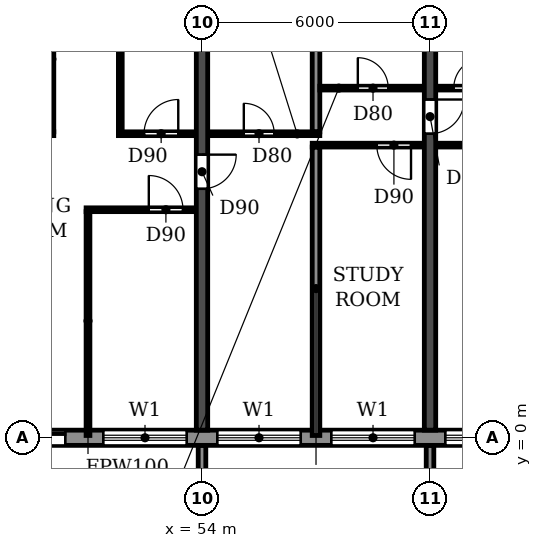
"""IFC4 building model, lengths in metres.
Left out: names, types, materials, properties, quantities, classifications, styles, units other than length and angle.
Written with IfcOpenShell. Run it as: python <this file> out.ifc"""

import sys

from ifc_helpers import new_model, si_unit, direction, frame, frame_2d, origin, place, context, subcontext, project, spatial, polyline, rectangle, outline, extrude, source, transform, mapped, element, fill, save


model = new_model("IFC4")
c1 = context("Model", 3, precision=1e-05, world=origin(), true_north=direction((0.0, 1.0)))
c2 = subcontext(c1, "Body", "Model", "MODEL_VIEW")
j1 = project(units=[si_unit("LENGTHUNIT", "METRE"), si_unit("PLANEANGLEUNIT", "RADIAN")], contexts=[c1])
p1 = place(None, origin())
s1 = spatial("IfcSite", under=j1, at=p1, CompositionType="ELEMENT")
p2 = place(p1, origin())
s2 = spatial("IfcBuilding", under=s1, at=p2, CompositionType="ELEMENT")
p3 = place(p2, frame((0.0, 0.0, 155.4)))
s3 = spatial("IfcBuildingStorey", under=s2, at=p3, CompositionType="ELEMENT", Elevation=155.4)
p4 = place(p3, frame((54.0, 0.2, 0.0), z_axis=(0.0, 0.0, 1.0), x_axis=(0.0, 1.0, 0.0)))
e1 = element("IfcWall", 1, at=p4, inside=s3, PredefinedType="SHEAR", context=c2, shape_type="SweptSolid", body=[
    extrude(rectangle(XDim=11.675, YDim=0.3, at=frame_2d((5.837, 0.0))), origin(), (0.0, 0.0, 1.0), 3.0),
])
p5 = place(p4, frame((6.35, 0.0, 0.0)))
e2 = element("IfcOpeningElement", 2, at=p5, cuts=e1, PredefinedType="OPENING", context=c2, shape_type="SweptSolid", body=[
    extrude(rectangle(XDim=0.9, YDim=2.1, at=frame_2d((0.45, 1.05))), frame((0.0, 0.16, 0.0), z_axis=(0.0, -1.0, 0.0), x_axis=(1.0, 0.0, 0.0)), (0.0, 0.0, 1.0), 0.32),
])
p6 = place(p3, frame((60.0, 0.2, 0.0), z_axis=(0.0, 0.0, 1.0), x_axis=(0.0, 1.0, 0.0)))
e3 = element("IfcWall", 3, at=p6, inside=s3, PredefinedType="SHEAR", context=c2, shape_type="SweptSolid", body=[
    extrude(rectangle(XDim=11.675, YDim=0.3, at=frame_2d((5.837, 0.0))), origin(), (0.0, 0.0, 1.0), 3.0),
])
p7 = place(p6, frame((7.8, 0.0, 0.0)))
e4 = element("IfcOpeningElement", 4, at=p7, cuts=e3, PredefinedType="OPENING", context=c2, shape_type="SweptSolid", body=[
    extrude(rectangle(XDim=0.9, YDim=2.1, at=frame_2d((0.45, 1.05))), frame((0.0, 0.16, 0.0), z_axis=(0.0, -1.0, 0.0), x_axis=(1.0, 0.0, 0.0)), (0.0, 0.0, 1.0), 0.32),
])
p8 = place(p3, frame((16.683, 0.0, 0.0), z_axis=(0.0, 0.0, 1.0), x_axis=(1.0, 0.0, 0.0)))
e5 = element("IfcWall", 5, at=p8, inside=s3, PredefinedType="STANDARD", context=c2, shape_type="SweptSolid", body=[
    extrude(rectangle(XDim=68.634, YDim=0.4, at=frame_2d((34.317, 0.0))), origin(), (0.0, 0.0, 1.0), 3.0),
])
p9 = place(p8, frame((1.717, 0.0, 0.9)))
e6 = element("IfcOpeningElement", 6, at=p9, cuts=e5, PredefinedType="OPENING", context=c2, shape_type="SweptSolid", body=[
    extrude(rectangle(XDim=2.2, YDim=1.5, at=frame_2d((1.1, 0.75))), frame((0.0, 0.21, 0.0), z_axis=(0.0, -1.0, 0.0), x_axis=(1.0, 0.0, 0.0)), (0.0, 0.0, 1.0), 0.42),
])
p10 = place(p8, frame((4.717, 0.0, 0.9)))
e7 = element("IfcOpeningElement", 7, at=p10, cuts=e5, PredefinedType="OPENING", context=c2, shape_type="SweptSolid", body=[
    extrude(rectangle(XDim=2.2, YDim=1.5, at=frame_2d((1.1, 0.75))), frame((0.0, 0.21, 0.0), z_axis=(0.0, -1.0, 0.0), x_axis=(1.0, 0.0, 0.0)), (0.0, 0.0, 1.0), 0.42),
])
p11 = place(p8, frame((7.917, 0.0, 0.0)))
e8 = element("IfcOpeningElement", 8, at=p11, cuts=e5, PredefinedType="OPENING", context=c2, shape_type="SweptSolid", body=[
    extrude(rectangle(XDim=1.8, YDim=2.4, at=frame_2d((0.9, 1.2))), frame((0.0, 0.21, 0.0), z_axis=(0.0, -1.0, 0.0), x_axis=(1.0, 0.0, 0.0)), (0.0, 0.0, 1.0), 0.42),
])
p12 = place(p8, frame((10.717, 0.0, 0.9)))
e9 = element("IfcOpeningElement", 9, at=p12, cuts=e5, PredefinedType="OPENING", context=c2, shape_type="SweptSolid", body=[
    extrude(rectangle(XDim=2.2, YDim=1.5, at=frame_2d((1.1, 0.75))), frame((0.0, 0.21, 0.0), z_axis=(0.0, -1.0, 0.0), x_axis=(1.0, 0.0, 0.0)), (0.0, 0.0, 1.0), 0.42),
])
p13 = place(p8, frame((13.717, 0.0, 0.9)))
e10 = element("IfcOpeningElement", 10, at=p13, cuts=e5, PredefinedType="OPENING", context=c2, shape_type="SweptSolid", body=[
    extrude(rectangle(XDim=2.2, YDim=1.5, at=frame_2d((1.1, 0.75))), frame((0.0, 0.21, 0.0), z_axis=(0.0, -1.0, 0.0), x_axis=(1.0, 0.0, 0.0)), (0.0, 0.0, 1.0), 0.42),
])
p14 = place(p8, frame((16.717, 0.0, 0.9)))
e11 = element("IfcOpeningElement", 11, at=p14, cuts=e5, PredefinedType="OPENING", context=c2, shape_type="SweptSolid", body=[
    extrude(rectangle(XDim=2.2, YDim=1.5, at=frame_2d((1.1, 0.75))), frame((0.0, 0.21, 0.0), z_axis=(0.0, -1.0, 0.0), x_axis=(1.0, 0.0, 0.0)), (0.0, 0.0, 1.0), 0.42),
])
p15 = place(p8, frame((19.717, 0.0, 0.9)))
e12 = element("IfcOpeningElement", 12, at=p15, cuts=e5, PredefinedType="OPENING", context=c2, shape_type="SweptSolid", body=[
    extrude(rectangle(XDim=2.2, YDim=1.5, at=frame_2d((1.1, 0.75))), frame((0.0, 0.21, 0.0), z_axis=(0.0, -1.0, 0.0), x_axis=(1.0, 0.0, 0.0)), (0.0, 0.0, 1.0), 0.42),
])
p16 = place(p8, frame((22.917, 0.0, 0.0)))
e13 = element("IfcOpeningElement", 13, at=p16, cuts=e5, PredefinedType="OPENING", context=c2, shape_type="SweptSolid", body=[
    extrude(rectangle(XDim=1.8, YDim=2.4, at=frame_2d((0.9, 1.2))), frame((0.0, 0.21, 0.0), z_axis=(0.0, -1.0, 0.0), x_axis=(1.0, 0.0, 0.0)), (0.0, 0.0, 1.0), 0.42),
])
p17 = place(p8, frame((25.717, 0.0, 0.9)))
e14 = element("IfcOpeningElement", 14, at=p17, cuts=e5, PredefinedType="OPENING", context=c2, shape_type="SweptSolid", body=[
    extrude(rectangle(XDim=2.2, YDim=1.5, at=frame_2d((1.1, 0.75))), frame((0.0, 0.21, 0.0), z_axis=(0.0, -1.0, 0.0), x_axis=(1.0, 0.0, 0.0)), (0.0, 0.0, 1.0), 0.42),
])
p18 = place(p8, frame((28.717, 0.0, 0.9)))
e15 = element("IfcOpeningElement", 15, at=p18, cuts=e5, PredefinedType="OPENING", context=c2, shape_type="SweptSolid", body=[
    extrude(rectangle(XDim=2.2, YDim=1.5, at=frame_2d((1.1, 0.75))), frame((0.0, 0.21, 0.0), z_axis=(0.0, -1.0, 0.0), x_axis=(1.0, 0.0, 0.0)), (0.0, 0.0, 1.0), 0.42),
])
p19 = place(p8, frame((31.917, 0.0, 0.0)))
e16 = element("IfcOpeningElement", 16, at=p19, cuts=e5, PredefinedType="OPENING", context=c2, shape_type="SweptSolid", body=[
    extrude(rectangle(XDim=1.8, YDim=2.4, at=frame_2d((0.9, 1.2))), frame((0.0, 0.21, 0.0), z_axis=(0.0, -1.0, 0.0), x_axis=(1.0, 0.0, 0.0)), (0.0, 0.0, 1.0), 0.42),
])
p20 = place(p8, frame((34.717, 0.0, 0.9)))
e17 = element("IfcOpeningElement", 17, at=p20, cuts=e5, PredefinedType="OPENING", context=c2, shape_type="SweptSolid", body=[
    extrude(rectangle(XDim=2.2, YDim=1.5, at=frame_2d((1.1, 0.75))), frame((0.0, 0.21, 0.0), z_axis=(0.0, -1.0, 0.0), x_axis=(1.0, 0.0, 0.0)), (0.0, 0.0, 1.0), 0.42),
])
p21 = place(p8, frame((37.717, 0.0, 0.9)))
e18 = element("IfcOpeningElement", 18, at=p21, cuts=e5, PredefinedType="OPENING", context=c2, shape_type="SweptSolid", body=[
    extrude(rectangle(XDim=2.2, YDim=1.5, at=frame_2d((1.1, 0.75))), frame((0.0, 0.21, 0.0), z_axis=(0.0, -1.0, 0.0), x_axis=(1.0, 0.0, 0.0)), (0.0, 0.0, 1.0), 0.42),
])
p22 = place(p8, frame((40.717, 0.0, 0.9)))
e19 = element("IfcOpeningElement", 19, at=p22, cuts=e5, PredefinedType="OPENING", context=c2, shape_type="SweptSolid", body=[
    extrude(rectangle(XDim=2.2, YDim=1.5, at=frame_2d((1.1, 0.75))), frame((0.0, 0.21, 0.0), z_axis=(0.0, -1.0, 0.0), x_axis=(1.0, 0.0, 0.0)), (0.0, 0.0, 1.0), 0.42),
])
p23 = place(p8, frame((43.717, 0.0, 0.9)))
e20 = element("IfcOpeningElement", 20, at=p23, cuts=e5, PredefinedType="OPENING", context=c2, shape_type="SweptSolid", body=[
    extrude(rectangle(XDim=2.2, YDim=1.5, at=frame_2d((1.1, 0.75))), frame((0.0, 0.21, 0.0), z_axis=(0.0, -1.0, 0.0), x_axis=(1.0, 0.0, 0.0)), (0.0, 0.0, 1.0), 0.42),
])
p24 = place(p8, frame((46.917, 0.0, 0.0)))
e21 = element("IfcOpeningElement", 21, at=p24, cuts=e5, PredefinedType="OPENING", context=c2, shape_type="SweptSolid", body=[
    extrude(rectangle(XDim=1.8, YDim=2.4, at=frame_2d((0.9, 1.2))), frame((0.0, 0.21, 0.0), z_axis=(0.0, -1.0, 0.0), x_axis=(1.0, 0.0, 0.0)), (0.0, 0.0, 1.0), 0.42),
])
p25 = place(p8, frame((49.717, 0.0, 0.9)))
e22 = element("IfcOpeningElement", 22, at=p25, cuts=e5, PredefinedType="OPENING", context=c2, shape_type="SweptSolid", body=[
    extrude(rectangle(XDim=2.2, YDim=1.5, at=frame_2d((1.1, 0.75))), frame((0.0, 0.21, 0.0), z_axis=(0.0, -1.0, 0.0), x_axis=(1.0, 0.0, 0.0)), (0.0, 0.0, 1.0), 0.42),
])
p26 = place(p8, frame((52.717, 0.0, 0.9)))
e23 = element("IfcOpeningElement", 23, at=p26, cuts=e5, PredefinedType="OPENING", context=c2, shape_type="SweptSolid", body=[
    extrude(rectangle(XDim=2.2, YDim=1.5, at=frame_2d((1.1, 0.75))), frame((0.0, 0.21, 0.0), z_axis=(0.0, -1.0, 0.0), x_axis=(1.0, 0.0, 0.0)), (0.0, 0.0, 1.0), 0.42),
])
p27 = place(p8, frame((55.717, 0.0, 0.9)))
e24 = element("IfcOpeningElement", 24, at=p27, cuts=e5, PredefinedType="OPENING", context=c2, shape_type="SweptSolid", body=[
    extrude(rectangle(XDim=2.2, YDim=1.5, at=frame_2d((1.1, 0.75))), frame((0.0, 0.21, 0.0), z_axis=(0.0, -1.0, 0.0), x_axis=(1.0, 0.0, 0.0)), (0.0, 0.0, 1.0), 0.42),
])
p28 = place(p8, frame((58.917, 0.0, 0.0)))
e25 = element("IfcOpeningElement", 25, at=p28, cuts=e5, PredefinedType="OPENING", context=c2, shape_type="SweptSolid", body=[
    extrude(rectangle(XDim=1.8, YDim=2.4, at=frame_2d((0.9, 1.2))), frame((0.0, 0.21, 0.0), z_axis=(0.0, -1.0, 0.0), x_axis=(1.0, 0.0, 0.0)), (0.0, 0.0, 1.0), 0.42),
])
p29 = place(p8, frame((61.717, 0.0, 0.9)))
e26 = element("IfcOpeningElement", 26, at=p29, cuts=e5, PredefinedType="OPENING", context=c2, shape_type="SweptSolid", body=[
    extrude(rectangle(XDim=2.2, YDim=1.5, at=frame_2d((1.1, 0.75))), frame((0.0, 0.21, 0.0), z_axis=(0.0, -1.0, 0.0), x_axis=(1.0, 0.0, 0.0)), (0.0, 0.0, 1.0), 0.42),
])
p30 = place(p8, frame((64.717, 0.0, 0.9)))
e27 = element("IfcOpeningElement", 27, at=p30, cuts=e5, PredefinedType="OPENING", context=c2, shape_type="SweptSolid", body=[
    extrude(rectangle(XDim=2.2, YDim=1.5, at=frame_2d((1.1, 0.75))), frame((0.0, 0.21, 0.0), z_axis=(0.0, -1.0, 0.0), x_axis=(1.0, 0.0, 0.0)), (0.0, 0.0, 1.0), 0.42),
])
m1 = source(origin(), c2, "Body", "SweptSolid", [
    extrude(outline(polyline([(0.0, 0.0), (0.2, 0.0), (0.2, 1.65), (0.0, 1.65), (0.0, 0.0)])), origin(), (0.0, 0.0, 1.0), 3.1),
])
for number, where in (
    (28, (53.9, -1.85, 0.0)),
    (29, (59.9, -1.85, 0.0)),
):
    element("IfcWall", number, at=place(p3, frame(where)), inside=s3, PredefinedType="STANDARD", context=c2, shape_type="MappedRepresentation", body=[
        mapped(m1, transform((0.0, 0.0, 0.0))),
    ])
p31 = place(p3, frame((57.0, 0.06, 0.0), z_axis=(0.0, 0.0, 1.0), x_axis=(0.0, 1.0, 0.0)))
e30 = element("IfcWall", 30, at=p31, inside=s3, PredefinedType="PARTITIONING", context=c2, shape_type="SweptSolid", body=[
    extrude(rectangle(XDim=7.59, YDim=0.2, at=frame_2d((3.795, 0.0))), origin(), (0.0, 0.0, 1.0), 3.0),
])
p32 = place(p3, frame((57.0, 8.05, 0.0), z_axis=(0.0, 0.0, 1.0), x_axis=(0.0, 1.0, 0.0)))
e31 = element("IfcWall", 31, at=p32, inside=s3, PredefinedType="PARTITIONING", context=c2, shape_type="SweptSolid", body=[
    extrude(rectangle(XDim=3.815, YDim=0.2, at=frame_2d((1.907, 0.0))), origin(), (0.0, 0.0, 1.0), 3.0),
])
p33 = place(p3, frame((50.95, 6.0, 0.0), z_axis=(0.0, 0.0, 1.0), x_axis=(1.0, 0.0, 0.0)))
e32 = element("IfcWall", 32, at=p33, inside=s3, PredefinedType="PARTITIONING", context=c2, shape_type="SweptSolid", body=[
    extrude(rectangle(XDim=2.89, YDim=0.1, at=frame_2d((1.445, 0.0))), origin(), (0.0, 0.0, 1.0), 3.0),
])
p34 = place(p33, frame((1.65, 0.0, 0.0)))
e33 = element("IfcOpeningElement", 33, at=p34, cuts=e32, PredefinedType="OPENING", context=c2, shape_type="SweptSolid", body=[
    extrude(rectangle(XDim=0.9, YDim=2.1, at=frame_2d((0.45, 1.05))), frame((0.0, 0.06, 0.0), z_axis=(0.0, -1.0, 0.0), x_axis=(1.0, 0.0, 0.0)), (0.0, 0.0, 1.0), 0.12),
])
p35 = place(p3, frame((56.9, 7.7, 0.0), z_axis=(0.0, 0.0, 1.0), x_axis=(1.0, 0.0, 0.0)))
e34 = element("IfcWall", 34, at=p35, inside=s3, PredefinedType="PARTITIONING", context=c2, shape_type="SweptSolid", body=[
    extrude(rectangle(XDim=2.94, YDim=0.1, at=frame_2d((1.47, 0.0))), origin(), (0.0, 0.0, 1.0), 3.0),
])
p36 = place(p35, frame((1.7, 0.0, 0.0)))
e35 = element("IfcOpeningElement", 35, at=p36, cuts=e34, PredefinedType="OPENING", context=c2, shape_type="SweptSolid", body=[
    extrude(rectangle(XDim=0.9, YDim=2.1, at=frame_2d((0.45, 1.05))), frame((0.0, 0.06, 0.0), z_axis=(0.0, -1.0, 0.0), x_axis=(1.0, 0.0, 0.0)), (0.0, 0.0, 1.0), 0.12),
])
p37 = place(p3, frame((60.16, 7.7, 0.0), z_axis=(0.0, 0.0, 1.0), x_axis=(1.0, 0.0, 0.0)))
e36 = element("IfcWall", 36, at=p37, inside=s3, PredefinedType="PARTITIONING", context=c2, shape_type="SweptSolid", body=[
    extrude(rectangle(XDim=2.89, YDim=0.1, at=frame_2d((1.445, 0.0))), origin(), (0.0, 0.0, 1.0), 3.0),
])
p38 = place(p37, frame((1.44, 0.0, 0.0)))
e37 = element("IfcOpeningElement", 37, at=p38, cuts=e36, PredefinedType="OPENING", context=c2, shape_type="SweptSolid", body=[
    extrude(rectangle(XDim=0.9, YDim=2.1, at=frame_2d((0.45, 1.05))), frame((0.0, 0.06, 0.0), z_axis=(0.0, -1.0, 0.0), x_axis=(1.0, 0.0, 0.0)), (0.0, 0.0, 1.0), 0.12),
])
p39 = place(p3, frame((48.16, 8.0, 0.0), z_axis=(0.0, 0.0, 1.0), x_axis=(1.0, 0.0, 0.0)))
e38 = element("IfcWall", 38, at=p39, inside=s3, PredefinedType="PARTITIONING", context=c2, shape_type="SweptSolid", body=[
    extrude(rectangle(XDim=1.94, YDim=0.1, at=frame_2d((0.97, 0.0))), origin(), (0.0, 0.0, 1.0), 3.0),
])
p40 = place(p39, frame((0.465, 0.0, 0.0)))
e39 = element("IfcOpeningElement", 39, at=p40, cuts=e38, PredefinedType="OPENING", context=c2, shape_type="SweptSolid", body=[
    extrude(rectangle(XDim=0.8, YDim=2.1, at=frame_2d((0.4, 1.05))), frame((0.0, 0.06, 0.0), z_axis=(0.0, -1.0, 0.0), x_axis=(1.0, 0.0, 0.0)), (0.0, 0.0, 1.0), 0.12),
])
p41 = place(p3, frame((51.8, 8.0, 0.0), z_axis=(0.0, 0.0, 1.0), x_axis=(1.0, 0.0, 0.0)))
e40 = element("IfcWall", 40, at=p41, inside=s3, PredefinedType="PARTITIONING", context=c2, shape_type="SweptSolid", body=[
    extrude(rectangle(XDim=2.04, YDim=0.1, at=frame_2d((1.02, 0.0))), origin(), (0.0, 0.0, 1.0), 3.0),
])
p42 = place(p41, frame((0.675, 0.0, 0.0)))
e41 = element("IfcOpeningElement", 41, at=p42, cuts=e40, PredefinedType="OPENING", context=c2, shape_type="SweptSolid", body=[
    extrude(rectangle(XDim=0.9, YDim=2.1, at=frame_2d((0.45, 1.05))), frame((0.0, 0.06, 0.0), z_axis=(0.0, -1.0, 0.0), x_axis=(1.0, 0.0, 0.0)), (0.0, 0.0, 1.0), 0.12),
])
p43 = place(p3, frame((54.16, 8.0, 0.0), z_axis=(0.0, 0.0, 1.0), x_axis=(1.0, 0.0, 0.0)))
e42 = element("IfcWall", 42, at=p43, inside=s3, PredefinedType="PARTITIONING", context=c2, shape_type="SweptSolid", body=[
    extrude(rectangle(XDim=2.94, YDim=0.1, at=frame_2d((1.47, 0.0))), origin(), (0.0, 0.0, 1.0), 3.0),
])
p44 = place(p43, frame((0.94, 0.0, 0.0)))
e43 = element("IfcOpeningElement", 43, at=p44, cuts=e42, PredefinedType="OPENING", context=c2, shape_type="SweptSolid", body=[
    extrude(rectangle(XDim=0.8, YDim=2.1, at=frame_2d((0.4, 1.05))), frame((0.0, 0.06, 0.0), z_axis=(0.0, -1.0, 0.0), x_axis=(1.0, 0.0, 0.0)), (0.0, 0.0, 1.0), 0.12),
])
p45 = place(p3, frame((57.1, 9.2, 0.0), z_axis=(0.0, 0.0, 1.0), x_axis=(1.0, 0.0, 0.0)))
e44 = element("IfcWall", 44, at=p45, inside=s3, PredefinedType="PARTITIONING", context=c2, shape_type="SweptSolid", body=[
    extrude(rectangle(XDim=2.74, YDim=0.1, at=frame_2d((1.37, 0.0))), origin(), (0.0, 0.0, 1.0), 3.0),
])
p46 = place(p45, frame((1.0, 0.0, 0.0)))
e45 = element("IfcOpeningElement", 45, at=p46, cuts=e44, PredefinedType="OPENING", context=c2, shape_type="SweptSolid", body=[
    extrude(rectangle(XDim=0.8, YDim=2.1, at=frame_2d((0.4, 1.05))), frame((0.0, 0.06, 0.0), z_axis=(0.0, -1.0, 0.0), x_axis=(1.0, 0.0, 0.0)), (0.0, 0.0, 1.0), 0.12),
])
p47 = place(p3, frame((60.16, 9.2, 0.0), z_axis=(0.0, 0.0, 1.0), x_axis=(1.0, 0.0, 0.0)))
e46 = element("IfcWall", 46, at=p47, inside=s3, PredefinedType="PARTITIONING", context=c2, shape_type="SweptSolid", body=[
    extrude(rectangle(XDim=1.94, YDim=0.1, at=frame_2d((0.97, 0.0))), origin(), (0.0, 0.0, 1.0), 3.0),
])
p48 = place(p47, frame((0.465, 0.0, 0.0)))
e47 = element("IfcOpeningElement", 47, at=p48, cuts=e46, PredefinedType="OPENING", context=c2, shape_type="SweptSolid", body=[
    extrude(rectangle(XDim=0.8, YDim=2.1, at=frame_2d((0.4, 1.05))), frame((0.0, 0.06, 0.0), z_axis=(0.0, -1.0, 0.0), x_axis=(1.0, 0.0, 0.0)), (0.0, 0.0, 1.0), 0.12),
])
p49 = place(p3, frame((50.05, 8.05, 0.0), z_axis=(0.0, 0.0, 1.0), x_axis=(0.0, 1.0, 0.0)))
e48 = element("IfcWall", 48, at=p49, inside=s3, PredefinedType="PARTITIONING", context=c2, shape_type="SweptSolid", body=[
    extrude(rectangle(XDim=3.815, YDim=0.1, at=frame_2d((1.907, 0.0))), origin(), (0.0, 0.0, 1.0), 3.0),
])
p50 = place(p3, frame((51.0, 0.06, 0.0), z_axis=(0.0, 0.0, 1.0), x_axis=(0.0, 1.0, 0.0)))
e49 = element("IfcWall", 49, at=p50, inside=s3, PredefinedType="PARTITIONING", context=c2, shape_type="SweptSolid", body=[
    extrude(rectangle(XDim=5.89, YDim=0.1, at=frame_2d((2.945, 0.0))), origin(), (0.0, 0.0, 1.0), 3.0),
])
p51 = place(p3, frame((51.85, 8.05, 0.0), z_axis=(0.0, 0.0, 1.0), x_axis=(0.0, 1.0, 0.0)))
e50 = element("IfcWall", 50, at=p51, inside=s3, PredefinedType="PARTITIONING", context=c2, shape_type="SweptSolid", body=[
    extrude(rectangle(XDim=3.815, YDim=0.1, at=frame_2d((1.907, 0.0))), origin(), (0.0, 0.0, 1.0), 3.0),
])
p52 = place(p19, origin())
e51 = element("IfcDoor", 51, at=p52, inside=s3, OperationType="DOUBLE_DOOR_SLIDING", PredefinedType="DOOR", context=c2, shape_type="SweptSolid", body=[
    extrude(rectangle(XDim=1.8, YDim=2.4, at=frame_2d((0.9, 1.2))), frame((0.0, 0.025, 0.0), z_axis=(0.0, -1.0, 0.0), x_axis=(1.0, 0.0, 0.0)), (0.0, 0.0, 1.0), 0.05),
])
fill(e16, e51)
p53 = place(p20, origin())
e52 = element("IfcWindow", 52, at=p53, inside=s3, PartitioningType="DOUBLE_PANEL_HORIZONTAL", PredefinedType="WINDOW", context=c2, shape_type="SweptSolid", body=[
    extrude(rectangle(XDim=2.2, YDim=1.5, at=frame_2d((1.1, 0.75))), frame((0.0, 0.03, 0.0), z_axis=(0.0, -1.0, 0.0), x_axis=(1.0, 0.0, 0.0)), (0.0, 0.0, 1.0), 0.06),
])
fill(e17, e52)
p54 = place(p21, origin())
e53 = element("IfcWindow", 53, at=p54, inside=s3, PartitioningType="DOUBLE_PANEL_HORIZONTAL", PredefinedType="WINDOW", context=c2, shape_type="SweptSolid", body=[
    extrude(rectangle(XDim=2.2, YDim=1.5, at=frame_2d((1.1, 0.75))), frame((0.0, 0.03, 0.0), z_axis=(0.0, -1.0, 0.0), x_axis=(1.0, 0.0, 0.0)), (0.0, 0.0, 1.0), 0.06),
])
fill(e18, e53)
p55 = place(p22, origin())
e54 = element("IfcWindow", 54, at=p55, inside=s3, PartitioningType="DOUBLE_PANEL_HORIZONTAL", PredefinedType="WINDOW", context=c2, shape_type="SweptSolid", body=[
    extrude(rectangle(XDim=2.2, YDim=1.5, at=frame_2d((1.1, 0.75))), frame((0.0, 0.03, 0.0), z_axis=(0.0, -1.0, 0.0), x_axis=(1.0, 0.0, 0.0)), (0.0, 0.0, 1.0), 0.06),
])
fill(e19, e54)
p56 = place(p23, origin())
e55 = element("IfcWindow", 55, at=p56, inside=s3, PartitioningType="DOUBLE_PANEL_HORIZONTAL", PredefinedType="WINDOW", context=c2, shape_type="SweptSolid", body=[
    extrude(rectangle(XDim=2.2, YDim=1.5, at=frame_2d((1.1, 0.75))), frame((0.0, 0.03, 0.0), z_axis=(0.0, -1.0, 0.0), x_axis=(1.0, 0.0, 0.0)), (0.0, 0.0, 1.0), 0.06),
])
fill(e20, e55)
p57 = place(p44, origin())
e56 = element("IfcDoor", 56, at=p57, inside=s3, OperationType="SINGLE_SWING_LEFT", PredefinedType="DOOR", context=c2, shape_type="SweptSolid", body=[
    extrude(rectangle(XDim=0.8, YDim=2.1, at=frame_2d((0.4, 1.05))), frame((0.0, 0.025, 0.0), z_axis=(0.0, -1.0, 0.0), x_axis=(1.0, 0.0, 0.0)), (0.0, 0.0, 1.0), 0.05),
])
fill(e43, e56)
p58 = place(p42, origin())
e57 = element("IfcDoor", 57, at=p58, inside=s3, OperationType="SINGLE_SWING_RIGHT", PredefinedType="DOOR", context=c2, shape_type="SweptSolid", body=[
    extrude(rectangle(XDim=0.9, YDim=2.1, at=frame_2d((0.45, 1.05))), frame((0.0, 0.025, 0.0), z_axis=(0.0, -1.0, 0.0), x_axis=(1.0, 0.0, 0.0)), (0.0, 0.0, 1.0), 0.05),
])
fill(e41, e57)
p59 = place(p34, origin())
e58 = element("IfcDoor", 58, at=p59, inside=s3, OperationType="SINGLE_SWING_LEFT", PredefinedType="DOOR", context=c2, shape_type="SweptSolid", body=[
    extrude(rectangle(XDim=0.9, YDim=2.1, at=frame_2d((0.45, 1.05))), frame((0.0, 0.025, 0.0), z_axis=(0.0, -1.0, 0.0), x_axis=(1.0, 0.0, 0.0)), (0.0, 0.0, 1.0), 0.05),
])
fill(e33, e58)
p60 = place(p5, frame((0.9, 0.0, 0.0), z_axis=(0.0, 0.0, 1.0), x_axis=(-1.0, 0.0, 0.0)))
e59 = element("IfcDoor", 59, at=p60, inside=s3, OperationType="SINGLE_SWING_LEFT", PredefinedType="DOOR", context=c2, shape_type="SweptSolid", body=[
    extrude(rectangle(XDim=0.9, YDim=2.1, at=frame_2d((0.45, 1.05))), frame((0.0, 0.025, 0.0), z_axis=(0.0, -1.0, 0.0), x_axis=(1.0, 0.0, 0.0)), (0.0, 0.0, 1.0), 0.05),
])
fill(e2, e59)
p61 = place(p46, origin())
e60 = element("IfcDoor", 60, at=p61, inside=s3, OperationType="SINGLE_SWING_LEFT", PredefinedType="DOOR", context=c2, shape_type="SweptSolid", body=[
    extrude(rectangle(XDim=0.8, YDim=2.1, at=frame_2d((0.4, 1.05))), frame((0.0, 0.025, 0.0), z_axis=(0.0, -1.0, 0.0), x_axis=(1.0, 0.0, 0.0)), (0.0, 0.0, 1.0), 0.05),
])
fill(e45, e60)
p62 = place(p36, frame((0.9, 0.0, 0.0), z_axis=(0.0, 0.0, 1.0), x_axis=(-1.0, 0.0, 0.0)))
e61 = element("IfcDoor", 61, at=p62, inside=s3, OperationType="SINGLE_SWING_LEFT", PredefinedType="DOOR", context=c2, shape_type="SweptSolid", body=[
    extrude(rectangle(XDim=0.9, YDim=2.1, at=frame_2d((0.45, 1.05))), frame((0.0, 0.025, 0.0), z_axis=(0.0, -1.0, 0.0), x_axis=(1.0, 0.0, 0.0)), (0.0, 0.0, 1.0), 0.05),
])
fill(e35, e61)
p63 = place(p7, frame((0.9, 0.0, 0.0), z_axis=(0.0, 0.0, 1.0), x_axis=(-1.0, 0.0, 0.0)))
e62 = element("IfcDoor", 62, at=p63, inside=s3, OperationType="SINGLE_SWING_LEFT", PredefinedType="DOOR", context=c2, shape_type="SweptSolid", body=[
    extrude(rectangle(XDim=0.9, YDim=2.1, at=frame_2d((0.45, 1.05))), frame((0.0, 0.025, 0.0), z_axis=(0.0, -1.0, 0.0), x_axis=(1.0, 0.0, 0.0)), (0.0, 0.0, 1.0), 0.05),
])
fill(e4, e62)
p64 = place(p48, origin())
e63 = element("IfcDoor", 63, at=p64, inside=s3, OperationType="SINGLE_SWING_RIGHT", PredefinedType="DOOR", context=c2, shape_type="SweptSolid", body=[
    extrude(rectangle(XDim=0.8, YDim=2.1, at=frame_2d((0.4, 1.05))), frame((0.0, 0.025, 0.0), z_axis=(0.0, -1.0, 0.0), x_axis=(1.0, 0.0, 0.0)), (0.0, 0.0, 1.0), 0.05),
])
fill(e47, e63)
save(model, sys.argv[1])
